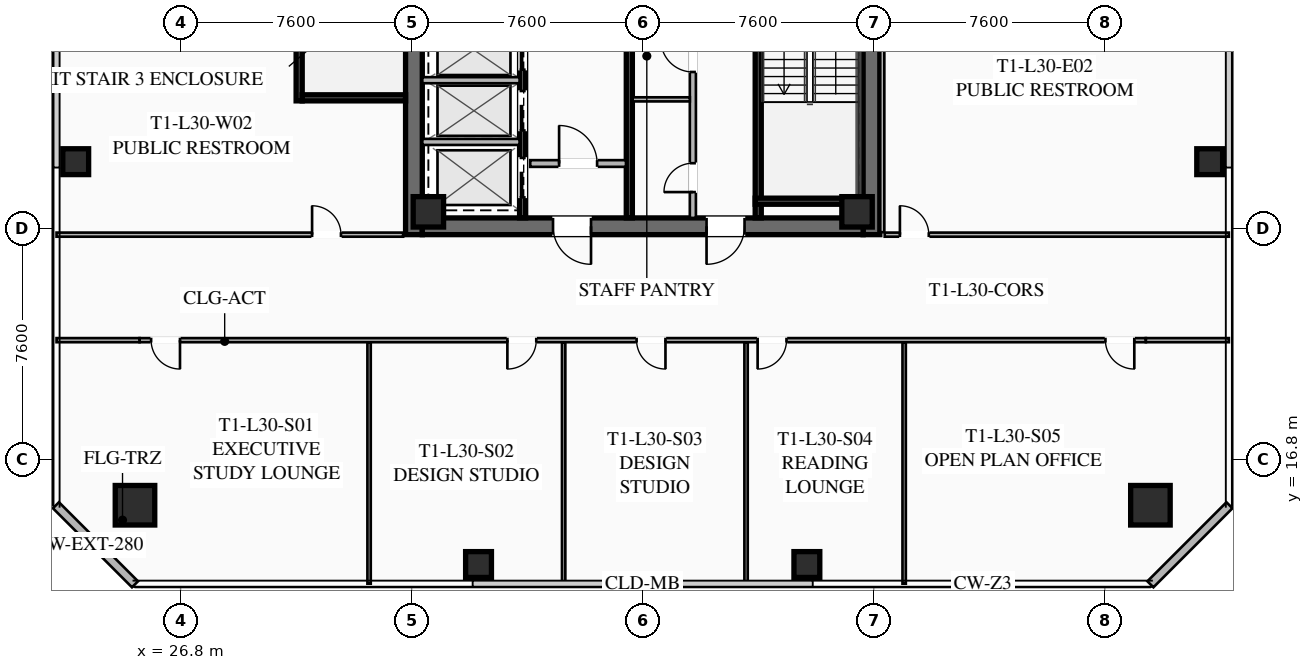
"""IFC4 building model, lengths in metres.
Left out: names, types, materials, properties, quantities, classifications, styles, units other than length and angle.
Written with IfcOpenShell. Run it as: python <this file> out.ifc"""

import sys

from ifc_helpers import new_model, si_unit, direction, frame, frame_2d, origin, origin_2d, place, context, subcontext, project, spatial, rectangle, hollow_rectangle, extrude, element, fill, save


model = new_model("IFC4")
c1 = context("Model", 3, precision=1e-05, world=origin(), true_north=direction((0.0, 1.0)))
c2 = subcontext(c1, "Body", "Model", "MODEL_VIEW")
j1 = project(units=[si_unit("LENGTHUNIT", "METRE"), si_unit("PLANEANGLEUNIT", "RADIAN")], contexts=[c1])
p1 = place(None, origin())
s1 = spatial("IfcSite", under=j1, at=p1, CompositionType="ELEMENT")
p2 = place(p1, origin())
s2 = spatial("IfcBuilding", under=s1, at=p2, CompositionType="ELEMENT")
p3 = place(p2, frame((0.0, 0.0, 114.4)))
s3 = spatial("IfcBuildingStorey", under=s2, at=p3, CompositionType="ELEMENT", Elevation=114.4)
for number, where, z_axis, x_axis in (
    (1, (34.475, 24.2, 0.0), (0.0, 0.0, 1.0), (0.0, 1.0, 0.0)),
    (2, (49.525, 39.8, 0.0), (0.0, 0.0, 1.0), (0.0, -1.0, 0.0)),
):
    element("IfcWall", number, at=place(p3, frame(where, z_axis=z_axis, x_axis=x_axis)), inside=s3, PredefinedType="SHEAR", context=c2, shape_type="SweptSolid", body=[
        extrude(rectangle(XDim=15.6, YDim=0.55, at=frame_2d((7.8, 0.0))), origin(), (0.0, 0.0, 1.0), 3.55),
    ])
p4 = place(p3, frame((49.25, 24.475, 0.0), z_axis=(0.0, 0.0, 1.0), x_axis=(-1.0, 0.0, 0.0)))
e3 = element("IfcWall", 3, at=p4, inside=s3, PredefinedType="SHEAR", context=c2, shape_type="SweptSolid", body=[
    extrude(rectangle(XDim=14.5, YDim=0.55, at=frame_2d((7.25, 0.0))), origin(), (0.0, 0.0, 1.0), 3.55),
])
p5 = place(p4, frame((8.95, 0.0, 0.0)))
e4 = element("IfcOpeningElement", 4, at=p5, cuts=e3, PredefinedType="OPENING", context=c2, shape_type="SweptSolid", body=[
    extrude(rectangle(XDim=1.25, YDim=2.25, at=frame_2d((0.625, 1.125))), frame((0.0, 0.285, 0.0), z_axis=(0.0, -1.0, 0.0), x_axis=(1.0, 0.0, 0.0)), (0.0, 0.0, 1.0), 0.57),
])
p6 = place(p4, frame((3.9, 0.0, 0.0)))
e5 = element("IfcOpeningElement", 5, at=p6, cuts=e3, PredefinedType="OPENING", context=c2, shape_type="SweptSolid", body=[
    extrude(rectangle(XDim=1.25, YDim=2.25, at=frame_2d((0.625, 1.125))), frame((0.0, 0.285, 0.0), z_axis=(0.0, -1.0, 0.0), x_axis=(1.0, 0.0, 0.0)), (0.0, 0.0, 1.0), 0.57),
])
for number, where, z_axis, x_axis in (
    (6, (34.95, 24.95, 0.0), (0.0, 0.0, 1.0), (1.0, 0.0, 0.0)),
    (7, (49.05, 24.95, 0.0), (0.0, 0.0, 1.0), (1.0, 0.0, 0.0)),
):
    element("IfcColumn", number, at=place(p3, frame(where, z_axis=z_axis, x_axis=x_axis)), inside=s3, PredefinedType="COLUMN", context=c2, shape_type="SweptSolid", body=[
        extrude(hollow_rectangle(XDim=1.0, YDim=1.0, WallThickness=0.04, at=origin_2d()), origin(), (0.0, 0.0, 1.0), 3.37),
    ])
for number, where, z_axis, x_axis in (
    (8, (25.3, 15.3, 0.0), (0.0, 0.0, 1.0), (1.0, 0.0, 0.0)),
    (9, (58.7, 15.3, 0.0), (0.0, 0.0, 1.0), (1.0, 0.0, 0.0)),
):
    element("IfcColumn", number, at=place(p3, frame(where, z_axis=z_axis, x_axis=x_axis)), inside=s3, PredefinedType="COLUMN", context=c2, shape_type="SweptSolid", body=[
        extrude(hollow_rectangle(XDim=1.3, YDim=1.3, WallThickness=0.05, at=origin_2d()), origin(), (0.0, 0.0, 1.0), 3.37),
    ])
for number, where, z_axis, x_axis in (
    (10, (36.6, 13.35, 0.0), (0.0, 0.0, 1.0), (1.0, 0.0, 0.0)),
    (11, (47.4, 13.35, 0.0), (0.0, 0.0, 1.0), (1.0, 0.0, 0.0)),
    (12, (60.65, 26.6, 0.0), (0.0, 0.0, 1.0), (1.0, 0.0, 0.0)),
    (13, (23.35, 26.6, 0.0), (0.0, 0.0, 1.0), (1.0, 0.0, 0.0)),
):
    element("IfcColumn", number, at=place(p3, frame(where, z_axis=z_axis, x_axis=x_axis)), inside=s3, PredefinedType="COLUMN", context=c2, shape_type="SweptSolid", body=[
        extrude(hollow_rectangle(XDim=0.85, YDim=0.85, WallThickness=0.035, at=origin_2d()), origin(), (0.0, 0.0, 1.0), 3.37),
    ])
for number, where, z_axis, x_axis in (
    (14, (25.3, 12.7, 0.0), (0.0, 0.0, 1.0), (-0.707, 0.707, 0.0)),
    (15, (61.3, 15.3, 0.0), (0.0, 0.0, 1.0), (-0.707, -0.707, 0.0)),
):
    element("IfcWall", number, at=place(p3, frame(where, z_axis=z_axis, x_axis=x_axis)), inside=s3, PredefinedType="SOLIDWALL", context=c2, shape_type="SweptSolid", body=[
        extrude(rectangle(XDim=3.677, YDim=0.28, at=frame_2d((1.838, 0.0))), origin(), (0.0, 0.0, 1.0), 3.37),
    ])
p7 = place(p3, frame((45.8, 32.8, 0.0), z_axis=(0.0, 0.0, 1.0), x_axis=(0.0, -1.0, 0.0)))
e16 = element("IfcWall", 16, at=p7, inside=s3, PredefinedType="SHEAR", context=c2, shape_type="SweptSolid", body=[
    extrude(rectangle(XDim=8.05, YDim=0.2, at=frame_2d((4.025, 0.0))), origin(), (0.0, 0.0, 1.0), 3.37),
])
p8 = place(p7, frame((0.45, 0.0, 0.0)))
e17 = element("IfcOpeningElement", 17, at=p8, cuts=e16, PredefinedType="OPENING", context=c2, shape_type="SweptSolid", body=[
    extrude(rectangle(XDim=1.15, YDim=2.2, at=frame_2d((0.575, 1.1))), frame((0.0, 0.11, 0.0), z_axis=(0.0, -1.0, 0.0), x_axis=(1.0, 0.0, 0.0)), (0.0, 0.0, 1.0), 0.22),
])
p9 = place(p3, frame((45.7, 25.3, 0.0), z_axis=(0.0, 0.0, 1.0), x_axis=(1.0, 0.0, 0.0)))
e18 = element("IfcWall", 18, at=p9, inside=s3, PredefinedType="SHEAR", context=c2, shape_type="SweptSolid", body=[
    extrude(rectangle(XDim=3.55, YDim=0.2, at=frame_2d((1.775, 0.0))), origin(), (0.0, 0.0, 1.0), 3.37),
])
p10 = place(p3, frame((41.56, 24.75, 0.0), z_axis=(0.0, 0.0, 1.0), x_axis=(0.0, 1.0, 0.0)))
e19 = element("IfcWall", 19, at=p10, inside=s3, PredefinedType="SHEAR", context=c2, shape_type="SweptSolid", body=[
    extrude(rectangle(XDim=14.5, YDim=0.2, at=frame_2d((7.25, 0.0))), origin(), (0.0, 0.0, 1.0), 3.37),
])
p11 = place(p3, frame((38.3, 26.54, 0.0), z_axis=(0.0, 0.0, 1.0), x_axis=(1.0, 0.0, 0.0)))
e20 = element("IfcWall", 20, at=p11, inside=s3, PredefinedType="SOLIDWALL", context=c2, shape_type="SweptSolid", body=[
    extrude(rectangle(XDim=3.15, YDim=0.22, at=frame_2d((1.575, 0.0))), origin(), (0.0, 0.0, 1.0), 2.723),
])
p12 = place(p11, frame((0.95, 0.0, 0.0)))
e21 = element("IfcOpeningElement", 21, at=p12, cuts=e20, PredefinedType="OPENING", context=c2, shape_type="SweptSolid", body=[
    extrude(rectangle(XDim=1.25, YDim=2.25, at=frame_2d((0.625, 1.125))), frame((0.0, 0.12, 0.0), z_axis=(0.0, -1.0, 0.0), x_axis=(1.0, 0.0, 0.0)), (0.0, 0.0, 1.0), 0.24),
])
p13 = place(p3, frame((38.05, 24.75, 0.0), z_axis=(0.0, 0.0, 1.0), x_axis=(0.0, 1.0, 0.0)))
e22 = element("IfcWall", 22, at=p13, inside=s3, PredefinedType="SHEAR", context=c2, shape_type="SweptSolid", body=[
    extrude(rectangle(XDim=6.45, YDim=0.2, at=frame_2d((3.225, 0.0))), origin(), (0.0, 0.0, 1.0), 3.37),
])
p14 = place(p13, frame((4.875, 0.0, 0.0)))
e23 = element("IfcOpeningElement", 23, at=p14, cuts=e22, PredefinedType="OPENING", context=c2, shape_type="SweptSolid", body=[
    extrude(rectangle(XDim=1.3, YDim=2.25, at=frame_2d((0.65, 1.125))), frame((0.0, 0.11, 0.0), z_axis=(0.0, -1.0, 0.0), x_axis=(1.0, 0.0, 0.0)), (0.0, 0.0, 1.0), 0.22),
])
p15 = place(p13, frame((2.875, 0.0, 0.0)))
e24 = element("IfcOpeningElement", 24, at=p15, cuts=e22, PredefinedType="OPENING", context=c2, shape_type="SweptSolid", body=[
    extrude(rectangle(XDim=1.3, YDim=2.25, at=frame_2d((0.65, 1.125))), frame((0.0, 0.11, 0.0), z_axis=(0.0, -1.0, 0.0), x_axis=(1.0, 0.0, 0.0)), (0.0, 0.0, 1.0), 0.22),
])
p16 = place(p13, frame((0.675, 0.0, 0.0)))
e25 = element("IfcOpeningElement", 25, at=p16, cuts=e22, PredefinedType="OPENING", context=c2, shape_type="SweptSolid", body=[
    extrude(rectangle(XDim=1.3, YDim=2.25, at=frame_2d((0.65, 1.125))), frame((0.0, 0.11, 0.0), z_axis=(0.0, -1.0, 0.0), x_axis=(1.0, 0.0, 0.0)), (0.0, 0.0, 1.0), 0.22),
])
for number, where, z_axis, x_axis in (
    (26, (34.75, 27.25, 0.0), (0.0, 0.0, 1.0), (1.0, 0.0, 0.0)),
    (27, (34.75, 29.28, 0.0), (0.0, 0.0, 1.0), (1.0, 0.0, 0.0)),
):
    element("IfcWall", number, at=place(p3, frame(where, z_axis=z_axis, x_axis=x_axis)), inside=s3, PredefinedType="SOLIDWALL", context=c2, shape_type="SweptSolid", body=[
        extrude(rectangle(XDim=3.2, YDim=0.2, at=frame_2d((1.6, 0.0))), origin(), (0.0, 0.0, 1.0), 3.37),
    ])
p17 = place(p3, frame((43.65, 24.75, 0.0), z_axis=(0.0, 0.0, 1.0), x_axis=(0.0, 1.0, 0.0)))
e28 = element("IfcWall", 28, at=p17, inside=s3, PredefinedType="SOLIDWALL", context=c2, shape_type="SweptSolid", body=[
    extrude(rectangle(XDim=6.9, YDim=0.2, at=frame_2d((3.45, 0.0))), origin(), (0.0, 0.0, 1.0), 2.723),
])
p18 = place(p17, frame((0.85, 0.0, 0.0)))
e29 = element("IfcOpeningElement", 29, at=p18, cuts=e28, PredefinedType="OPENING", context=c2, shape_type="SweptSolid", body=[
    extrude(rectangle(XDim=0.95, YDim=2.05, at=frame_2d((0.475, 1.025))), frame((0.0, 0.11, 0.0), z_axis=(0.0, -1.0, 0.0), x_axis=(1.0, 0.0, 0.0)), (0.0, 0.0, 1.0), 0.22),
])
p19 = place(p17, frame((4.8, 0.0, 0.0)))
e30 = element("IfcOpeningElement", 30, at=p19, cuts=e28, PredefinedType="OPENING", context=c2, shape_type="SweptSolid", body=[
    extrude(rectangle(XDim=1.05, YDim=2.2, at=frame_2d((0.525, 1.1))), frame((0.0, 0.11, 0.0), z_axis=(0.0, -1.0, 0.0), x_axis=(1.0, 0.0, 0.0)), (0.0, 0.0, 1.0), 0.22),
])
p20 = place(p3, frame((41.67, 28.65, 0.0), z_axis=(0.0, 0.0, 1.0), x_axis=(1.0, 0.0, 0.0)))
e31 = element("IfcWall", 31, at=p20, inside=s3, PredefinedType="PARTITIONING", context=c2, shape_type="SweptSolid", body=[
    extrude(rectangle(XDim=1.88, YDim=0.135, at=frame_2d((0.94, 0.0))), origin(), (0.0, 0.0, 1.0), 2.723),
])
p21 = place(p3, frame((30.7, 28.6, 0.0), z_axis=(0.0, 0.0, 1.0), x_axis=(0.0, 1.0, 0.0)))
e32 = element("IfcWall", 32, at=p21, inside=s3, PredefinedType="SHEAR", context=c2, shape_type="SweptSolid", body=[
    extrude(rectangle(XDim=6.8, YDim=0.2, at=frame_2d((3.4, 0.0))), origin(), (0.0, 0.0, 1.0), 3.37),
])
p22 = place(p3, frame((30.8, 28.7, 0.0), z_axis=(0.0, 0.0, 1.0), x_axis=(1.0, 0.0, 0.0)))
e33 = element("IfcWall", 33, at=p22, inside=s3, PredefinedType="SHEAR", context=c2, shape_type="SweptSolid", body=[
    extrude(rectangle(XDim=3.4, YDim=0.2, at=frame_2d((1.7, 0.0))), origin(), (0.0, 0.0, 1.0), 3.37),
])
p23 = place(p3, frame((58.55, 20.73, 0.0), z_axis=(0.0, 0.0, 1.0), x_axis=(-1.0, 0.0, 0.0)))
e34 = element("IfcWall", 34, at=p23, inside=s3, PredefinedType="PARTITIONING", context=c2, shape_type="SweptSolid", body=[
    extrude(rectangle(XDim=33.1, YDim=0.135, at=frame_2d((16.55, 0.0))), origin(), (0.0, 0.0, 1.0), 2.723),
])
p24 = place(p23, frame((31.77, 0.0, 0.0)))
e35 = element("IfcOpeningElement", 35, at=p24, cuts=e34, PredefinedType="OPENING", context=c2, shape_type="SweptSolid", body=[
    extrude(rectangle(XDim=0.95, YDim=2.05, at=frame_2d((0.475, 1.025))), frame((0.0, 0.077, 0.0), z_axis=(0.0, -1.0, 0.0), x_axis=(1.0, 0.0, 0.0)), (0.0, 0.0, 1.0), 0.155),
])
p25 = place(p23, frame((20.051, 0.0, 0.0)))
e36 = element("IfcOpeningElement", 36, at=p25, cuts=e34, PredefinedType="OPENING", context=c2, shape_type="SweptSolid", body=[
    extrude(rectangle(XDim=0.95, YDim=2.05, at=frame_2d((0.475, 1.025))), frame((0.0, 0.077, 0.0), z_axis=(0.0, -1.0, 0.0), x_axis=(1.0, 0.0, 0.0)), (0.0, 0.0, 1.0), 0.155),
])
p26 = place(p23, frame((15.801, 0.0, 0.0)))
e37 = element("IfcOpeningElement", 37, at=p26, cuts=e34, PredefinedType="OPENING", context=c2, shape_type="SweptSolid", body=[
    extrude(rectangle(XDim=0.95, YDim=2.05, at=frame_2d((0.475, 1.025))), frame((0.0, 0.077, 0.0), z_axis=(0.0, -1.0, 0.0), x_axis=(1.0, 0.0, 0.0)), (0.0, 0.0, 1.0), 0.155),
])
p27 = place(p23, frame((11.82, 0.0, 0.0)))
e38 = element("IfcOpeningElement", 38, at=p27, cuts=e34, PredefinedType="OPENING", context=c2, shape_type="SweptSolid", body=[
    extrude(rectangle(XDim=0.95, YDim=2.05, at=frame_2d((0.475, 1.025))), frame((0.0, 0.077, 0.0), z_axis=(0.0, -1.0, 0.0), x_axis=(1.0, 0.0, 0.0)), (0.0, 0.0, 1.0), 0.155),
])
p28 = place(p23, frame((0.38, 0.0, 0.0)))
e39 = element("IfcOpeningElement", 39, at=p28, cuts=e34, PredefinedType="OPENING", context=c2, shape_type="SweptSolid", body=[
    extrude(rectangle(XDim=0.95, YDim=2.05, at=frame_2d((0.475, 1.025))), frame((0.0, 0.077, 0.0), z_axis=(0.0, -1.0, 0.0), x_axis=(1.0, 0.0, 0.0)), (0.0, 0.0, 1.0), 0.155),
])
for number, where, z_axis, x_axis in (
    (40, (22.72, 20.73, 0.0), (0.0, 0.0, 1.0), (1.0, 0.0, 0.0)),
    (41, (58.55, 20.73, 0.0), (0.0, 0.0, 1.0), (1.0, 0.0, 0.0)),
):
    element("IfcWall", number, at=place(p3, frame(where, z_axis=z_axis, x_axis=x_axis)), inside=s3, PredefinedType="PARTITIONING", context=c2, shape_type="SweptSolid", body=[
        extrude(rectangle(XDim=2.73, YDim=0.135, at=frame_2d((1.365, 0.0))), origin(), (0.0, 0.0, 1.0), 2.723),
    ])
for number, where, z_axis, x_axis in (
    (42, (33.0, 12.72, 0.0), (0.0, 0.0, 1.0), (0.0, 1.0, 0.0)),
    (43, (39.4, 12.72, 0.0), (0.0, 0.0, 1.0), (0.0, 1.0, 0.0)),
    (44, (45.4, 12.72, 0.0), (0.0, 0.0, 1.0), (0.0, 1.0, 0.0)),
    (45, (50.6, 12.72, 0.0), (0.0, 0.0, 1.0), (0.0, 1.0, 0.0)),
):
    element("IfcWall", number, at=place(p3, frame(where, z_axis=z_axis, x_axis=x_axis)), inside=s3, PredefinedType="PARTITIONING", context=c2, shape_type="SweptSolid", body=[
        extrude(rectangle(XDim=7.93, YDim=0.11, at=frame_2d((3.965, 0.0))), origin(), (0.0, 0.0, 1.0), 2.723),
    ])
p29 = place(p3, frame((49.88, 39.72, 0.0), z_axis=(0.0, 0.0, 1.0), x_axis=(0.0, -1.0, 0.0)))
e46 = element("IfcWall", 46, at=p29, inside=s3, PredefinedType="PARTITIONING", context=c2, shape_type="SweptSolid", body=[
    extrude(rectangle(XDim=15.44, YDim=0.135, at=frame_2d((7.72, 0.0))), origin(), (0.0, 0.0, 1.0), 2.723),
])
p30 = place(p3, frame((49.96, 24.2, 0.0), z_axis=(0.0, 0.0, 1.0), x_axis=(1.0, 0.0, 0.0)))
e47 = element("IfcWall", 47, at=p30, inside=s3, PredefinedType="PARTITIONING", context=c2, shape_type="SweptSolid", body=[
    extrude(rectangle(XDim=11.32, YDim=0.135, at=frame_2d((5.66, 0.0))), origin(), (0.0, 0.0, 1.0), 2.723),
])
p31 = place(p30, frame((0.5, 0.0, 0.0)))
e48 = element("IfcOpeningElement", 48, at=p31, cuts=e47, PredefinedType="OPENING", context=c2, shape_type="SweptSolid", body=[
    extrude(rectangle(XDim=0.95, YDim=2.05, at=frame_2d((0.475, 1.025))), frame((0.0, 0.077, 0.0), z_axis=(0.0, -1.0, 0.0), x_axis=(1.0, 0.0, 0.0)), (0.0, 0.0, 1.0), 0.155),
])
p32 = place(p3, frame((22.72, 24.2, 0.0), z_axis=(0.0, 0.0, 1.0), x_axis=(1.0, 0.0, 0.0)))
e49 = element("IfcWall", 49, at=p32, inside=s3, PredefinedType="PARTITIONING", context=c2, shape_type="SweptSolid", body=[
    extrude(rectangle(XDim=11.4, YDim=0.135, at=frame_2d((5.7, 0.0))), origin(), (0.0, 0.0, 1.0), 2.723),
])
p33 = place(p32, frame((8.405, 0.0, 0.0)))
e50 = element("IfcOpeningElement", 50, at=p33, cuts=e49, PredefinedType="OPENING", context=c2, shape_type="SweptSolid", body=[
    extrude(rectangle(XDim=0.95, YDim=2.05, at=frame_2d((0.475, 1.025))), frame((0.0, 0.077, 0.0), z_axis=(0.0, -1.0, 0.0), x_axis=(1.0, 0.0, 0.0)), (0.0, 0.0, 1.0), 0.155),
])
p34 = place(p5, origin())
e51 = element("IfcDoor", 51, at=p34, inside=s3, OperationType="SINGLE_SWING_LEFT", PredefinedType="DOOR", context=c2, shape_type="SweptSolid", body=[
    extrude(rectangle(XDim=1.25, YDim=2.25, at=frame_2d((0.625, 1.125))), frame((0.0, 0.025, 0.0), z_axis=(0.0, -1.0, 0.0), x_axis=(1.0, 0.0, 0.0)), (0.0, 0.0, 1.0), 0.05),
])
fill(e4, e51)
p35 = place(p6, origin())
e52 = element("IfcDoor", 52, at=p35, inside=s3, OperationType="SINGLE_SWING_RIGHT", PredefinedType="DOOR", context=c2, shape_type="SweptSolid", body=[
    extrude(rectangle(XDim=1.25, YDim=2.25, at=frame_2d((0.625, 1.125))), frame((0.0, 0.025, 0.0), z_axis=(0.0, -1.0, 0.0), x_axis=(1.0, 0.0, 0.0)), (0.0, 0.0, 1.0), 0.05),
])
fill(e5, e52)
p36 = place(p12, origin())
e53 = element("IfcDoor", 53, at=p36, inside=s3, OperationType="SINGLE_SWING_LEFT", PredefinedType="DOOR", context=c2, shape_type="SweptSolid", body=[
    extrude(rectangle(XDim=1.25, YDim=2.25, at=frame_2d((0.625, 1.125))), frame((0.0, 0.025, 0.0), z_axis=(0.0, -1.0, 0.0), x_axis=(1.0, 0.0, 0.0)), (0.0, 0.0, 1.0), 0.05),
])
fill(e21, e53)
p37 = place(p18, origin())
e54 = element("IfcDoor", 54, at=p37, inside=s3, OperationType="SINGLE_SWING_LEFT", PredefinedType="DOOR", context=c2, shape_type="SweptSolid", body=[
    extrude(rectangle(XDim=0.95, YDim=2.05, at=frame_2d((0.475, 1.025))), frame((0.0, 0.025, 0.0), z_axis=(0.0, -1.0, 0.0), x_axis=(1.0, 0.0, 0.0)), (0.0, 0.0, 1.0), 0.05),
])
fill(e29, e54)
p38 = place(p19, origin())
e55 = element("IfcDoor", 55, at=p38, inside=s3, OperationType="SINGLE_SWING_RIGHT", PredefinedType="DOOR", context=c2, shape_type="SweptSolid", body=[
    extrude(rectangle(XDim=1.05, YDim=2.2, at=frame_2d((0.525, 1.1))), frame((0.0, 0.025, 0.0), z_axis=(0.0, -1.0, 0.0), x_axis=(1.0, 0.0, 0.0)), (0.0, 0.0, 1.0), 0.05),
])
fill(e30, e55)
p39 = place(p24, origin())
e56 = element("IfcDoor", 56, at=p39, inside=s3, OperationType="SINGLE_SWING_LEFT", PredefinedType="DOOR", context=c2, shape_type="SweptSolid", body=[
    extrude(rectangle(XDim=0.95, YDim=2.05, at=frame_2d((0.475, 1.025))), frame((0.0, 0.025, 0.0), z_axis=(0.0, -1.0, 0.0), x_axis=(1.0, 0.0, 0.0)), (0.0, 0.0, 1.0), 0.05),
])
fill(e35, e56)
p40 = place(p25, origin())
e57 = element("IfcDoor", 57, at=p40, inside=s3, OperationType="SINGLE_SWING_RIGHT", PredefinedType="DOOR", context=c2, shape_type="SweptSolid", body=[
    extrude(rectangle(XDim=0.95, YDim=2.05, at=frame_2d((0.475, 1.025))), frame((0.0, 0.025, 0.0), z_axis=(0.0, -1.0, 0.0), x_axis=(1.0, 0.0, 0.0)), (0.0, 0.0, 1.0), 0.05),
])
fill(e36, e57)
p41 = place(p26, origin())
e58 = element("IfcDoor", 58, at=p41, inside=s3, OperationType="SINGLE_SWING_LEFT", PredefinedType="DOOR", context=c2, shape_type="SweptSolid", body=[
    extrude(rectangle(XDim=0.95, YDim=2.05, at=frame_2d((0.475, 1.025))), frame((0.0, 0.025, 0.0), z_axis=(0.0, -1.0, 0.0), x_axis=(1.0, 0.0, 0.0)), (0.0, 0.0, 1.0), 0.05),
])
fill(e37, e58)
p42 = place(p27, origin())
e59 = element("IfcDoor", 59, at=p42, inside=s3, OperationType="SINGLE_SWING_RIGHT", PredefinedType="DOOR", context=c2, shape_type="SweptSolid", body=[
    extrude(rectangle(XDim=0.95, YDim=2.05, at=frame_2d((0.475, 1.025))), frame((0.0, 0.025, 0.0), z_axis=(0.0, -1.0, 0.0), x_axis=(1.0, 0.0, 0.0)), (0.0, 0.0, 1.0), 0.05),
])
fill(e38, e59)
p43 = place(p28, origin())
e60 = element("IfcDoor", 60, at=p43, inside=s3, OperationType="SINGLE_SWING_LEFT", PredefinedType="DOOR", context=c2, shape_type="SweptSolid", body=[
    extrude(rectangle(XDim=0.95, YDim=2.05, at=frame_2d((0.475, 1.025))), frame((0.0, 0.025, 0.0), z_axis=(0.0, -1.0, 0.0), x_axis=(1.0, 0.0, 0.0)), (0.0, 0.0, 1.0), 0.05),
])
fill(e39, e60)
p44 = place(p31, origin())
e61 = element("IfcDoor", 61, at=p44, inside=s3, OperationType="SINGLE_SWING_LEFT", PredefinedType="DOOR", context=c2, shape_type="SweptSolid", body=[
    extrude(rectangle(XDim=0.95, YDim=2.05, at=frame_2d((0.475, 1.025))), frame((0.0, 0.025, 0.0), z_axis=(0.0, -1.0, 0.0), x_axis=(1.0, 0.0, 0.0)), (0.0, 0.0, 1.0), 0.05),
])
fill(e48, e61)
p45 = place(p33, origin())
e62 = element("IfcDoor", 62, at=p45, inside=s3, OperationType="SINGLE_SWING_LEFT", PredefinedType="DOOR", context=c2, shape_type="SweptSolid", body=[
    extrude(rectangle(XDim=0.95, YDim=2.05, at=frame_2d((0.475, 1.025))), frame((0.0, 0.025, 0.0), z_axis=(0.0, -1.0, 0.0), x_axis=(1.0, 0.0, 0.0)), (0.0, 0.0, 1.0), 0.05),
])
fill(e50, e62)
p46 = place(p14, origin())
e63 = element("IfcDoor", 63, at=p46, inside=s3, OperationType="SLIDING_TO_LEFT", PredefinedType="DOOR", context=c2, shape_type="SweptSolid", body=[
    extrude(rectangle(XDim=1.3, YDim=2.25, at=frame_2d((0.65, 1.125))), frame((0.0, 0.025, 0.0), z_axis=(0.0, -1.0, 0.0), x_axis=(1.0, 0.0, 0.0)), (0.0, 0.0, 1.0), 0.05),
])
fill(e23, e63)
p47 = place(p15, origin())
e64 = element("IfcDoor", 64, at=p47, inside=s3, OperationType="SLIDING_TO_LEFT", PredefinedType="DOOR", context=c2, shape_type="SweptSolid", body=[
    extrude(rectangle(XDim=1.3, YDim=2.25, at=frame_2d((0.65, 1.125))), frame((0.0, 0.025, 0.0), z_axis=(0.0, -1.0, 0.0), x_axis=(1.0, 0.0, 0.0)), (0.0, 0.0, 1.0), 0.05),
])
fill(e24, e64)
p48 = place(p16, origin())
e65 = element("IfcDoor", 65, at=p48, inside=s3, OperationType="SLIDING_TO_LEFT", PredefinedType="DOOR", context=c2, shape_type="SweptSolid", body=[
    extrude(rectangle(XDim=1.3, YDim=2.25, at=frame_2d((0.65, 1.125))), frame((0.0, 0.025, 0.0), z_axis=(0.0, -1.0, 0.0), x_axis=(1.0, 0.0, 0.0)), (0.0, 0.0, 1.0), 0.05),
])
fill(e25, e65)
save(model, sys.argv[1])
